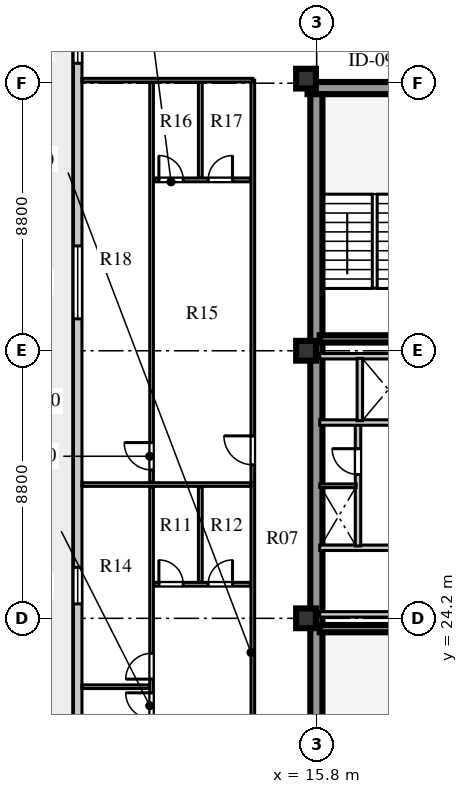
"""IFC4 building model, lengths in metres.
Left out: names, types, materials, properties, quantities, classifications, styles, units other than length and angle.
Written with IfcOpenShell. Run it as: python <this file> out.ifc"""

import sys

from ifc_helpers import new_model, si_unit, direction, frame, frame_2d, origin, origin_2d, place, context, subcontext, project, spatial, rectangle, extrude, element, fill, save


model = new_model("IFC4")
c1 = context("Model", 3, precision=1e-05, world=origin(), true_north=direction((0.0, 1.0)))
c2 = subcontext(c1, "Body", "Model", "MODEL_VIEW")
j1 = project(units=[si_unit("LENGTHUNIT", "METRE"), si_unit("PLANEANGLEUNIT", "RADIAN")], contexts=[c1])
p1 = place(None, origin())
s1 = spatial("IfcSite", under=j1, at=p1, CompositionType="ELEMENT")
p2 = place(p1, origin())
s2 = spatial("IfcBuilding", under=s1, at=p2, CompositionType="ELEMENT")
p3 = place(p2, frame((0.0, 0.0, 214.1)))
s3 = spatial("IfcBuildingStorey", under=s2, at=p3, CompositionType="ELEMENT", Elevation=214.1)
p4 = place(p3, frame((15.5, 41.64, 0.0), z_axis=(0.0, 0.0, 1.0), x_axis=(1.0, 0.0, 0.0)))
e1 = element("IfcWall", 1, at=p4, inside=s3, PredefinedType="SHEAR", context=c2, shape_type="SweptSolid", body=[
    extrude(rectangle(XDim=9.48, YDim=0.4, at=frame_2d((4.74, 0.0))), origin(), (0.0, 0.0, 1.0), 3.66),
])
p5 = place(p3, frame((15.79, 15.81, 0.0), z_axis=(0.0, 0.0, 1.0), x_axis=(0.0, 1.0, 0.0)))
e2 = element("IfcWall", 2, at=p5, inside=s3, PredefinedType="SHEAR", context=c2, shape_type="SweptSolid", body=[
    extrude(rectangle(XDim=25.63, YDim=0.4, at=frame_2d((12.815, 0.0))), origin(), (0.0, 0.0, 1.0), 3.66),
])
for number, where, z_axis, x_axis in (
    (3, (15.45, 24.2, 0.0), (0.0, 0.0, 1.0), (1.0, 0.0, 0.0)),
    (4, (15.45, 33.0, 0.0), (0.0, 0.0, 1.0), (1.0, 0.0, 0.0)),
    (5, (15.45, 41.95, 0.0), (0.0, 0.0, 1.0), (1.0, 0.0, 0.0)),
):
    element("IfcColumn", number, at=place(p3, frame(where, z_axis=z_axis, x_axis=x_axis)), inside=s3, PredefinedType="COLUMN", context=c2, shape_type="SweptSolid", body=[
        extrude(rectangle(XDim=0.65, YDim=0.65, at=origin_2d()), origin(), (0.0, 0.0, 1.0), 3.66),
    ])
p6 = place(p3, frame((7.94, 44.07, 0.0), z_axis=(0.0, 0.0, 1.0), x_axis=(0.0, -1.0, 0.0)))
e6 = element("IfcWall", 6, at=p6, inside=s3, PredefinedType="STANDARD", context=c2, shape_type="SweptSolid", body=[
    extrude(rectangle(XDim=30.94, YDim=0.28, at=frame_2d((15.47, 0.0))), origin(), (0.0, 0.0, 1.0), 3.66),
])
p7 = place(p6, frame((29.325, 0.0, 0.8)))
e7 = element("IfcOpeningElement", 7, at=p7, cuts=e6, PredefinedType="OPENING", context=c2, shape_type="SweptSolid", body=[
    extrude(rectangle(XDim=0.95, YDim=1.65, at=frame_2d((0.475, 0.825))), frame((0.0, 0.15, 0.0), z_axis=(0.0, -1.0, 0.0), x_axis=(1.0, 0.0, 0.0)), (0.0, 0.0, 1.0), 0.3),
])
p8 = place(p6, frame((27.28, 0.0, 0.0)))
e8 = element("IfcOpeningElement", 8, at=p8, cuts=e6, PredefinedType="OPENING", context=c2, shape_type="SweptSolid", body=[
    extrude(rectangle(XDim=1.0, YDim=2.05, at=frame_2d((0.5, 1.025))), frame((0.0, 0.15, 0.0), z_axis=(0.0, -1.0, 0.0), x_axis=(1.0, 0.0, 0.0)), (0.0, 0.0, 1.0), 0.3),
])
p9 = place(p6, frame((23.92, 0.0, 0.8)))
e9 = element("IfcOpeningElement", 9, at=p9, cuts=e6, PredefinedType="OPENING", context=c2, shape_type="SweptSolid", body=[
    extrude(rectangle(XDim=1.5, YDim=2.0, at=frame_2d((0.75, 1.0))), frame((0.0, 0.15, 0.0), z_axis=(0.0, -1.0, 0.0), x_axis=(1.0, 0.0, 0.0)), (0.0, 0.0, 1.0), 0.3),
])
p10 = place(p6, frame((18.195, 0.0, 0.8)))
e10 = element("IfcOpeningElement", 10, at=p10, cuts=e6, PredefinedType="OPENING", context=c2, shape_type="SweptSolid", body=[
    extrude(rectangle(XDim=1.2, YDim=1.75, at=frame_2d((0.6, 0.875))), frame((0.0, 0.15, 0.0), z_axis=(0.0, -1.0, 0.0), x_axis=(1.0, 0.0, 0.0)), (0.0, 0.0, 1.0), 0.3),
])
p11 = place(p6, frame((7.62, 0.0, 0.8)))
e11 = element("IfcOpeningElement", 11, at=p11, cuts=e6, PredefinedType="OPENING", context=c2, shape_type="SweptSolid", body=[
    extrude(rectangle(XDim=2.4, YDim=2.05, at=frame_2d((1.2, 1.025))), frame((0.0, 0.15, 0.0), z_axis=(0.0, -1.0, 0.0), x_axis=(1.0, 0.0, 0.0)), (0.0, 0.0, 1.0), 0.3),
])
p12 = place(p6, frame((0.665, 0.0, 0.8)))
e12 = element("IfcOpeningElement", 12, at=p12, cuts=e6, PredefinedType="OPENING", context=c2, shape_type="SweptSolid", body=[
    extrude(rectangle(XDim=0.95, YDim=1.65, at=frame_2d((0.475, 0.825))), frame((0.0, 0.15, 0.0), z_axis=(0.0, -1.0, 0.0), x_axis=(1.0, 0.0, 0.0)), (0.0, 0.0, 1.0), 0.3),
])
p13 = place(p3, frame((15.9, 23.86, 0.0), z_axis=(0.0, 0.0, 1.0), x_axis=(1.0, 0.0, 0.0)))
e13 = element("IfcWall", 13, at=p13, inside=s3, PredefinedType="SHEAR", context=c2, shape_type="SweptSolid", body=[
    extrude(rectangle(XDim=3.52, YDim=0.24, at=frame_2d((1.76, 0.0))), origin(), (0.0, 0.0, 1.0), 3.9),
])
p14 = place(p3, frame((15.9, 26.52, 0.0), z_axis=(0.0, 0.0, 1.0), x_axis=(1.0, 0.0, 0.0)))
e14 = element("IfcWall", 14, at=p14, inside=s3, PredefinedType="SOLIDWALL", context=c2, shape_type="SweptSolid", body=[
    extrude(rectangle(XDim=8.68, YDim=0.18, at=frame_2d((4.34, 0.0))), origin(), (0.0, 0.0, 1.0), 3.66),
])
p15 = place(p14, frame((2.5, 0.0, 0.0)))
e15 = element("IfcOpeningElement", 15, at=p15, cuts=e14, PredefinedType="OPENING", context=c2, shape_type="SweptSolid", body=[
    extrude(rectangle(XDim=0.95, YDim=2.1, at=frame_2d((0.475, 1.05))), frame((0.0, 0.1, 0.0), z_axis=(0.0, -1.0, 0.0), x_axis=(1.0, 0.0, 0.0)), (0.0, 0.0, 1.0), 0.2),
])
p16 = place(p14, frame((6.0, 0.0, 0.0)))
e16 = element("IfcOpeningElement", 16, at=p16, cuts=e14, PredefinedType="OPENING", context=c2, shape_type="SweptSolid", body=[
    extrude(rectangle(XDim=0.95, YDim=2.1, at=frame_2d((0.475, 1.05))), frame((0.0, 0.1, 0.0), z_axis=(0.0, -1.0, 0.0), x_axis=(1.0, 0.0, 0.0)), (0.0, 0.0, 1.0), 0.2),
])
p17 = place(p3, frame((15.9, 24.33, 0.0), z_axis=(0.0, 0.0, 1.0), x_axis=(1.0, 0.0, 0.0)))
e17 = element("IfcWall", 17, at=p17, inside=s3, PredefinedType="SOLIDWALL", context=c2, shape_type="SweptSolid", body=[
    extrude(rectangle(XDim=8.68, YDim=0.18, at=frame_2d((4.34, 0.0))), origin(), (0.0, 0.0, 1.0), 3.06),
])
p18 = place(p3, frame((17.16, 26.58, 0.0), z_axis=(0.0, 0.0, 1.0), x_axis=(0.0, 1.0, 0.0)))
e18 = element("IfcWall", 18, at=p18, inside=s3, PredefinedType="SOLIDWALL", context=c2, shape_type="SweptSolid", body=[
    extrude(rectangle(XDim=4.02, YDim=0.18, at=frame_2d((2.01, 0.0))), origin(), (0.0, 0.0, 1.0), 3.66),
])
p19 = place(p18, frame((2.35, 0.0, 0.0)))
e19 = element("IfcOpeningElement", 19, at=p19, cuts=e18, PredefinedType="OPENING", context=c2, shape_type="SweptSolid", body=[
    extrude(rectangle(XDim=0.85, YDim=2.06, at=frame_2d((0.425, 1.03))), frame((0.0, 0.1, 0.0), z_axis=(0.0, -1.0, 0.0), x_axis=(1.0, 0.0, 0.0)), (0.0, 0.0, 1.0), 0.2),
])
p20 = place(p3, frame((15.9, 28.56, 0.0), z_axis=(0.0, 0.0, 1.0), x_axis=(1.0, 0.0, 0.0)))
e20 = element("IfcWall", 20, at=p20, inside=s3, PredefinedType="PARTITIONING", context=c2, shape_type="SweptSolid", body=[
    extrude(rectangle(XDim=1.2, YDim=0.12, at=frame_2d((0.6, 0.0))), origin(), (0.0, 0.0, 1.0), 3.66),
])
p21 = place(p3, frame((15.9, 30.64, 0.0), z_axis=(0.0, 0.0, 1.0), x_axis=(1.0, 0.0, 0.0)))
e21 = element("IfcWall", 21, at=p21, inside=s3, PredefinedType="SOLIDWALL", context=c2, shape_type="SweptSolid", body=[
    extrude(rectangle(XDim=8.68, YDim=0.18, at=frame_2d((4.34, 0.0))), origin(), (0.0, 0.0, 1.0), 3.66),
])
p22 = place(p3, frame((15.9, 32.82, 0.0), z_axis=(0.0, 0.0, 1.0), x_axis=(1.0, 0.0, 0.0)))
e22 = element("IfcWall", 22, at=p22, inside=s3, PredefinedType="SOLIDWALL", context=c2, shape_type="SweptSolid", body=[
    extrude(rectangle(XDim=8.68, YDim=0.18, at=frame_2d((4.34, 0.0))), origin(), (0.0, 0.0, 1.0), 3.06),
])
p23 = place(p3, frame((17.22, 30.7, 0.0), z_axis=(0.0, 0.0, 1.0), x_axis=(0.0, 1.0, 0.0)))
e23 = element("IfcWall", 23, at=p23, inside=s3, PredefinedType="SOLIDWALL", context=c2, shape_type="SweptSolid", body=[
    extrude(rectangle(XDim=2.05, YDim=0.18, at=frame_2d((1.025, 0.0))), origin(), (0.0, 0.0, 1.0), 3.66),
])
p24 = place(p3, frame((15.9, 33.39, 0.0), z_axis=(0.0, 0.0, 1.0), x_axis=(1.0, 0.0, 0.0)))
e24 = element("IfcWall", 24, at=p24, inside=s3, PredefinedType="SHEAR", context=c2, shape_type="SweptSolid", body=[
    extrude(rectangle(XDim=3.52, YDim=0.24, at=frame_2d((1.76, 0.0))), origin(), (0.0, 0.0, 1.0), 3.9),
])
p25 = place(p3, frame((13.7, 15.3, 0.0), z_axis=(0.0, 0.0, 1.0), x_axis=(0.0, 1.0, 0.0)))
e25 = element("IfcWall", 25, at=p25, inside=s3, PredefinedType="PARTITIONING", context=c2, shape_type="SweptSolid", body=[
    extrude(rectangle(XDim=26.6, YDim=0.12, at=frame_2d((13.3, 0.0))), origin(), (0.0, 0.0, 1.0), 3.66),
])
p26 = place(p25, frame((0.65, 0.0, 0.0)))
e26 = element("IfcOpeningElement", 26, at=p26, cuts=e25, PredefinedType="OPENING", context=c2, shape_type="SweptSolid", body=[
    extrude(rectangle(XDim=0.95, YDim=2.1, at=frame_2d((0.475, 1.05))), frame((0.0, 0.07, 0.0), z_axis=(0.0, -1.0, 0.0), x_axis=(1.0, 0.0, 0.0)), (0.0, 0.0, 1.0), 0.14),
])
p27 = place(p25, frame((13.95, 0.0, 0.0)))
e27 = element("IfcOpeningElement", 27, at=p27, cuts=e25, PredefinedType="OPENING", context=c2, shape_type="SweptSolid", body=[
    extrude(rectangle(XDim=0.95, YDim=2.1, at=frame_2d((0.475, 1.05))), frame((0.0, 0.07, 0.0), z_axis=(0.0, -1.0, 0.0), x_axis=(1.0, 0.0, 0.0)), (0.0, 0.0, 1.0), 0.14),
])
p28 = place(p3, frame((8.08, 41.9, 0.0), z_axis=(0.0, 0.0, 1.0), x_axis=(1.0, 0.0, 0.0)))
e28 = element("IfcWall", 28, at=p28, inside=s3, PredefinedType="PARTITIONING", context=c2, shape_type="SweptSolid", body=[
    extrude(rectangle(XDim=5.62, YDim=0.12, at=frame_2d((2.81, 0.0))), origin(), (0.0, 0.0, 1.0), 3.21),
])
p29 = place(p3, frame((10.37, 15.38, 0.0), z_axis=(0.0, 0.0, 1.0), x_axis=(0.0, 1.0, 0.0)))
e29 = element("IfcWall", 29, at=p29, inside=s3, PredefinedType="PARTITIONING", context=c2, shape_type="SweptSolid", body=[
    extrude(rectangle(XDim=13.14, YDim=0.12, at=frame_2d((6.57, 0.0))), origin(), (0.0, 0.0, 1.0), 3.66),
])
p30 = place(p29, frame((5.52, 0.0, 0.0)))
e30 = element("IfcOpeningElement", 30, at=p30, cuts=e29, PredefinedType="OPENING", context=c2, shape_type="SweptSolid", body=[
    extrude(rectangle(XDim=0.85, YDim=2.08, at=frame_2d((0.425, 1.04))), frame((0.0, 0.07, 0.0), z_axis=(0.0, -1.0, 0.0), x_axis=(1.0, 0.0, 0.0)), (0.0, 0.0, 1.0), 0.14),
])
p31 = place(p29, frame((6.82, 0.0, 0.0)))
e31 = element("IfcOpeningElement", 31, at=p31, cuts=e29, PredefinedType="OPENING", context=c2, shape_type="SweptSolid", body=[
    extrude(rectangle(XDim=0.85, YDim=2.08, at=frame_2d((0.425, 1.04))), frame((0.0, 0.07, 0.0), z_axis=(0.0, -1.0, 0.0), x_axis=(1.0, 0.0, 0.0)), (0.0, 0.0, 1.0), 0.14),
])
p32 = place(p3, frame((10.45, 25.32, 0.0), z_axis=(0.0, 0.0, 1.0), x_axis=(1.0, 0.0, 0.0)))
e32 = element("IfcWall", 32, at=p32, inside=s3, PredefinedType="PLUMBINGWALL", context=c2, shape_type="SweptSolid", body=[
    extrude(rectangle(XDim=3.17, YDim=0.125, at=frame_2d((1.585, 0.0))), origin(), (0.0, 0.0, 1.0), 3.66),
])
p33 = place(p32, frame((0.16, 0.0, 0.0)))
e33 = element("IfcOpeningElement", 33, at=p33, cuts=e32, PredefinedType="OPENING", context=c2, shape_type="SweptSolid", body=[
    extrude(rectangle(XDim=0.8, YDim=2.05, at=frame_2d((0.4, 1.025))), frame((0.0, 0.073, 0.0), z_axis=(0.0, -1.0, 0.0), x_axis=(1.0, 0.0, 0.0)), (0.0, 0.0, 1.0), 0.145),
])
p34 = place(p32, frame((1.782, 0.0, 0.0)))
e34 = element("IfcOpeningElement", 34, at=p34, cuts=e32, PredefinedType="OPENING", context=c2, shape_type="SweptSolid", body=[
    extrude(rectangle(XDim=0.8, YDim=2.05, at=frame_2d((0.4, 1.025))), frame((0.0, 0.073, 0.0), z_axis=(0.0, -1.0, 0.0), x_axis=(1.0, 0.0, 0.0)), (0.0, 0.0, 1.0), 0.145),
])
p35 = place(p3, frame((11.972, 25.4, 0.0), z_axis=(0.0, 0.0, 1.0), x_axis=(0.0, 1.0, 0.0)))
e35 = element("IfcWall", 35, at=p35, inside=s3, PredefinedType="PLUMBINGWALL", context=c2, shape_type="SweptSolid", body=[
    extrude(rectangle(XDim=3.12, YDim=0.125, at=frame_2d((1.56, 0.0))), origin(), (0.0, 0.0, 1.0), 3.66),
])
p36 = place(p3, frame((8.08, 21.95, 0.0), z_axis=(0.0, 0.0, 1.0), x_axis=(1.0, 0.0, 0.0)))
e36 = element("IfcWall", 36, at=p36, inside=s3, PredefinedType="PARTITIONING", context=c2, shape_type="SweptSolid", body=[
    extrude(rectangle(XDim=2.21, YDim=0.12, at=frame_2d((1.105, 0.0))), origin(), (0.0, 0.0, 1.0), 3.66),
])
p37 = place(p3, frame((8.08, 28.6, 0.0), z_axis=(0.0, 0.0, 1.0), x_axis=(1.0, 0.0, 0.0)))
e37 = element("IfcWall", 37, at=p37, inside=s3, PredefinedType="PARTITIONING", context=c2, shape_type="SweptSolid", body=[
    extrude(rectangle(XDim=5.56, YDim=0.12, at=frame_2d((2.78, 0.0))), origin(), (0.0, 0.0, 1.0), 3.66),
])
p38 = place(p3, frame((10.37, 28.68, 0.0), z_axis=(0.0, 0.0, 1.0), x_axis=(0.0, 1.0, 0.0)))
e38 = element("IfcWall", 38, at=p38, inside=s3, PredefinedType="PARTITIONING", context=c2, shape_type="SweptSolid", body=[
    extrude(rectangle(XDim=13.14, YDim=0.12, at=frame_2d((6.57, 0.0))), origin(), (0.0, 0.0, 1.0), 3.66),
])
p39 = place(p38, frame((0.4, 0.0, 0.0)))
e39 = element("IfcOpeningElement", 39, at=p39, cuts=e38, PredefinedType="OPENING", context=c2, shape_type="SweptSolid", body=[
    extrude(rectangle(XDim=0.9, YDim=2.08, at=frame_2d((0.45, 1.04))), frame((0.0, 0.07, 0.0), z_axis=(0.0, -1.0, 0.0), x_axis=(1.0, 0.0, 0.0)), (0.0, 0.0, 1.0), 0.14),
])
p40 = place(p3, frame((10.45, 38.62, 0.0), z_axis=(0.0, 0.0, 1.0), x_axis=(1.0, 0.0, 0.0)))
e40 = element("IfcWall", 40, at=p40, inside=s3, PredefinedType="PLUMBINGWALL", context=c2, shape_type="SweptSolid", body=[
    extrude(rectangle(XDim=3.17, YDim=0.125, at=frame_2d((1.585, 0.0))), origin(), (0.0, 0.0, 1.0), 3.66),
])
p41 = place(p40, frame((0.16, 0.0, 0.0)))
e41 = element("IfcOpeningElement", 41, at=p41, cuts=e40, PredefinedType="OPENING", context=c2, shape_type="SweptSolid", body=[
    extrude(rectangle(XDim=0.8, YDim=2.05, at=frame_2d((0.4, 1.025))), frame((0.0, 0.073, 0.0), z_axis=(0.0, -1.0, 0.0), x_axis=(1.0, 0.0, 0.0)), (0.0, 0.0, 1.0), 0.145),
])
p42 = place(p40, frame((1.782, 0.0, 0.0)))
e42 = element("IfcOpeningElement", 42, at=p42, cuts=e40, PredefinedType="OPENING", context=c2, shape_type="SweptSolid", body=[
    extrude(rectangle(XDim=0.8, YDim=2.05, at=frame_2d((0.4, 1.025))), frame((0.0, 0.073, 0.0), z_axis=(0.0, -1.0, 0.0), x_axis=(1.0, 0.0, 0.0)), (0.0, 0.0, 1.0), 0.145),
])
p43 = place(p3, frame((11.972, 38.7, 0.0), z_axis=(0.0, 0.0, 1.0), x_axis=(0.0, 1.0, 0.0)))
e43 = element("IfcWall", 43, at=p43, inside=s3, PredefinedType="PLUMBINGWALL", context=c2, shape_type="SweptSolid", body=[
    extrude(rectangle(XDim=3.12, YDim=0.125, at=frame_2d((1.56, 0.0))), origin(), (0.0, 0.0, 1.0), 3.66),
])
p44 = place(p10, origin())
e44 = element("IfcWindow", 44, at=p44, inside=s3, PartitioningType="SINGLE_PANEL", PredefinedType="WINDOW", context=c2, shape_type="SweptSolid", body=[
    extrude(rectangle(XDim=1.2, YDim=1.75, at=frame_2d((0.6, 0.875))), frame((0.0, 0.03, 0.0), z_axis=(0.0, -1.0, 0.0), x_axis=(1.0, 0.0, 0.0)), (0.0, 0.0, 1.0), 0.06),
])
fill(e10, e44)
p45 = place(p11, origin())
e45 = element("IfcWindow", 45, at=p45, inside=s3, PartitioningType="SINGLE_PANEL", PredefinedType="WINDOW", context=c2, shape_type="SweptSolid", body=[
    extrude(rectangle(XDim=2.4, YDim=2.05, at=frame_2d((1.2, 1.025))), frame((0.0, 0.03, 0.0), z_axis=(0.0, -1.0, 0.0), x_axis=(1.0, 0.0, 0.0)), (0.0, 0.0, 1.0), 0.06),
])
fill(e11, e45)
p46 = place(p12, origin())
e46 = element("IfcWindow", 46, at=p46, inside=s3, PartitioningType="SINGLE_PANEL", PredefinedType="WINDOW", context=c2, shape_type="SweptSolid", body=[
    extrude(rectangle(XDim=0.95, YDim=1.65, at=frame_2d((0.475, 0.825))), frame((0.0, 0.03, 0.0), z_axis=(0.0, -1.0, 0.0), x_axis=(1.0, 0.0, 0.0)), (0.0, 0.0, 1.0), 0.06),
])
fill(e12, e46)
p47 = place(p19, origin())
e47 = element("IfcDoor", 47, at=p47, inside=s3, OperationType="SINGLE_SWING_RIGHT", PredefinedType="DOOR", context=c2, shape_type="SweptSolid", body=[
    extrude(rectangle(XDim=0.85, YDim=2.06, at=frame_2d((0.425, 1.03))), frame((0.0, 0.025, 0.0), z_axis=(0.0, -1.0, 0.0), x_axis=(1.0, 0.0, 0.0)), (0.0, 0.0, 1.0), 0.05),
])
fill(e19, e47)
p48 = place(p33, origin())
e48 = element("IfcDoor", 48, at=p48, inside=s3, OperationType="SINGLE_SWING_LEFT", PredefinedType="DOOR", context=c2, shape_type="SweptSolid", body=[
    extrude(rectangle(XDim=0.8, YDim=2.05, at=frame_2d((0.4, 1.025))), frame((0.0, 0.025, 0.0), z_axis=(0.0, -1.0, 0.0), x_axis=(1.0, 0.0, 0.0)), (0.0, 0.0, 1.0), 0.05),
])
fill(e33, e48)
p49 = place(p34, origin())
e49 = element("IfcDoor", 49, at=p49, inside=s3, OperationType="SINGLE_SWING_RIGHT", PredefinedType="DOOR", context=c2, shape_type="SweptSolid", body=[
    extrude(rectangle(XDim=0.8, YDim=2.05, at=frame_2d((0.4, 1.025))), frame((0.0, 0.025, 0.0), z_axis=(0.0, -1.0, 0.0), x_axis=(1.0, 0.0, 0.0)), (0.0, 0.0, 1.0), 0.05),
])
fill(e34, e49)
p50 = place(p30, frame((0.85, 0.0, 0.0), z_axis=(0.0, 0.0, 1.0), x_axis=(-1.0, 0.0, 0.0)))
e50 = element("IfcDoor", 50, at=p50, inside=s3, OperationType="SINGLE_SWING_LEFT", PredefinedType="DOOR", context=c2, shape_type="SweptSolid", body=[
    extrude(rectangle(XDim=0.85, YDim=2.08, at=frame_2d((0.425, 1.04))), frame((0.0, 0.025, 0.0), z_axis=(0.0, -1.0, 0.0), x_axis=(1.0, 0.0, 0.0)), (0.0, 0.0, 1.0), 0.05),
])
fill(e30, e50)
p51 = place(p31, frame((0.85, 0.0, 0.0), z_axis=(0.0, 0.0, 1.0), x_axis=(-1.0, 0.0, 0.0)))
e51 = element("IfcDoor", 51, at=p51, inside=s3, OperationType="SINGLE_SWING_RIGHT", PredefinedType="DOOR", context=c2, shape_type="SweptSolid", body=[
    extrude(rectangle(XDim=0.85, YDim=2.08, at=frame_2d((0.425, 1.04))), frame((0.0, 0.025, 0.0), z_axis=(0.0, -1.0, 0.0), x_axis=(1.0, 0.0, 0.0)), (0.0, 0.0, 1.0), 0.05),
])
fill(e31, e51)
p52 = place(p41, origin())
e52 = element("IfcDoor", 52, at=p52, inside=s3, OperationType="SINGLE_SWING_LEFT", PredefinedType="DOOR", context=c2, shape_type="SweptSolid", body=[
    extrude(rectangle(XDim=0.8, YDim=2.05, at=frame_2d((0.4, 1.025))), frame((0.0, 0.025, 0.0), z_axis=(0.0, -1.0, 0.0), x_axis=(1.0, 0.0, 0.0)), (0.0, 0.0, 1.0), 0.05),
])
fill(e41, e52)
p53 = place(p42, origin())
e53 = element("IfcDoor", 53, at=p53, inside=s3, OperationType="SINGLE_SWING_RIGHT", PredefinedType="DOOR", context=c2, shape_type="SweptSolid", body=[
    extrude(rectangle(XDim=0.8, YDim=2.05, at=frame_2d((0.4, 1.025))), frame((0.0, 0.025, 0.0), z_axis=(0.0, -1.0, 0.0), x_axis=(1.0, 0.0, 0.0)), (0.0, 0.0, 1.0), 0.05),
])
fill(e42, e53)
p54 = place(p39, frame((0.9, 0.0, 0.0), z_axis=(0.0, 0.0, 1.0), x_axis=(-1.0, 0.0, 0.0)))
e54 = element("IfcDoor", 54, at=p54, inside=s3, OperationType="SINGLE_SWING_LEFT", PredefinedType="DOOR", context=c2, shape_type="SweptSolid", body=[
    extrude(rectangle(XDim=0.9, YDim=2.08, at=frame_2d((0.45, 1.04))), frame((0.0, 0.025, 0.0), z_axis=(0.0, -1.0, 0.0), x_axis=(1.0, 0.0, 0.0)), (0.0, 0.0, 1.0), 0.05),
])
fill(e39, e54)
p55 = place(p27, frame((0.95, 0.0, 0.0), z_axis=(0.0, 0.0, 1.0), x_axis=(-1.0, 0.0, 0.0)))
e55 = element("IfcDoor", 55, at=p55, inside=s3, OperationType="SINGLE_SWING_LEFT", PredefinedType="DOOR", context=c2, shape_type="SweptSolid", body=[
    extrude(rectangle(XDim=0.95, YDim=2.1, at=frame_2d((0.475, 1.05))), frame((0.0, 0.025, 0.0), z_axis=(0.0, -1.0, 0.0), x_axis=(1.0, 0.0, 0.0)), (0.0, 0.0, 1.0), 0.05),
])
fill(e27, e55)
save(model, sys.argv[1])
